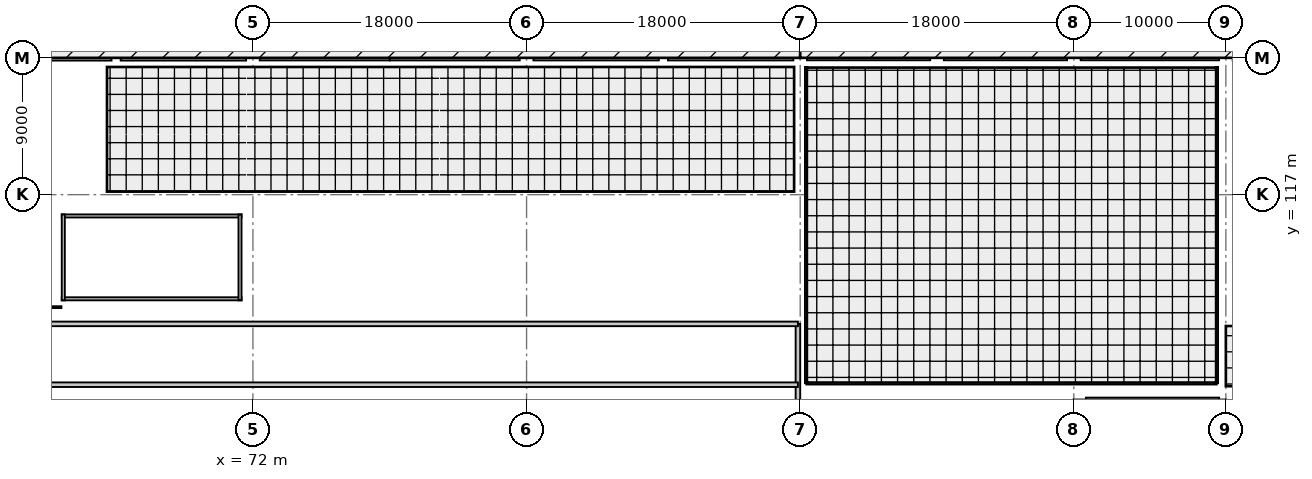
"""IFC4 building model, lengths in metres.
Left out: names, types, materials, properties, quantities, classifications, styles, units other than length and angle.
Written with IfcOpenShell. Run it as: python <this file> out.ifc"""

import sys

from ifc_helpers import new_model, si_unit, direction, frame, frame_2d, origin, origin_2d, place, context, subcontext, project, spatial, rectangle, i_section, extrude, element, fill, save


model = new_model("IFC4")
c1 = context("Model", 3, precision=1e-05, world=origin(), true_north=direction((0.0, 1.0)))
c2 = subcontext(c1, "Body", "Model", "MODEL_VIEW")
j1 = project(units=[si_unit("LENGTHUNIT", "METRE"), si_unit("PLANEANGLEUNIT", "RADIAN")], contexts=[c1])
p1 = place(None, origin())
s1 = spatial("IfcSite", under=j1, at=p1, CompositionType="ELEMENT")
p2 = place(p1, origin())
s2 = spatial("IfcBuilding", under=s1, at=p2, CompositionType="ELEMENT")
p3 = place(p2, origin())
s3 = spatial("IfcBuildingStorey", under=s2, at=p3, CompositionType="ELEMENT", Elevation=0.0)
p4 = place(p3, frame((72.0, 103.5, 0.0), z_axis=(0.0, 0.0, 1.0), x_axis=(1.0, 0.0, 0.0)))
e1 = element("IfcColumn", 1, at=p4, inside=s3, PredefinedType="COLUMN", context=c2, shape_type="SweptSolid", body=[
    extrude(rectangle(XDim=1.6, YDim=1.2, at=origin_2d()), origin(), (0.0, 0.0, 1.0), 6.6),
])
for number, where, z_axis, x_axis in (
    (2, (72.0, 117.0, 0.0), (0.0, 0.0, 1.0), (1.0, 0.0, 0.0)),
    (3, (72.0, 126.0, 0.0), (0.0, 0.0, 1.0), (1.0, 0.0, 0.0)),
):
    element("IfcColumn", number, at=place(p3, frame(where, z_axis=z_axis, x_axis=x_axis)), inside=s3, PredefinedType="COLUMN", context=c2, shape_type="SweptSolid", body=[
        extrude(rectangle(XDim=0.9, YDim=0.9, at=origin_2d()), origin(), (0.0, 0.0, 1.0), 6.6),
    ])
p5 = place(p3, frame((90.0, 103.5, 0.0), z_axis=(0.0, 0.0, 1.0), x_axis=(1.0, 0.0, 0.0)))
e4 = element("IfcColumn", 4, at=p5, inside=s3, PredefinedType="COLUMN", context=c2, shape_type="SweptSolid", body=[
    extrude(rectangle(XDim=1.6, YDim=1.2, at=origin_2d()), origin(), (0.0, 0.0, 1.0), 6.6),
])
for number, where, z_axis, x_axis in (
    (5, (90.0, 117.0, 0.0), (0.0, 0.0, 1.0), (1.0, 0.0, 0.0)),
    (6, (90.0, 126.0, 0.0), (0.0, 0.0, 1.0), (1.0, 0.0, 0.0)),
):
    element("IfcColumn", number, at=place(p3, frame(where, z_axis=z_axis, x_axis=x_axis)), inside=s3, PredefinedType="COLUMN", context=c2, shape_type="SweptSolid", body=[
        extrude(rectangle(XDim=0.9, YDim=0.9, at=origin_2d()), origin(), (0.0, 0.0, 1.0), 6.6),
    ])
p6 = place(p3, frame((108.0, 103.5, 0.0), z_axis=(0.0, 0.0, 1.0), x_axis=(1.0, 0.0, 0.0)))
e7 = element("IfcColumn", 7, at=p6, inside=s3, PredefinedType="COLUMN", context=c2, shape_type="SweptSolid", body=[
    extrude(rectangle(XDim=1.6, YDim=1.2, at=origin_2d()), origin(), (0.0, 0.0, 1.0), 6.6),
])
for number, where, z_axis, x_axis in (
    (8, (108.0, 117.0, 0.0), (0.0, 0.0, 1.0), (1.0, 0.0, 0.0)),
    (9, (108.0, 126.0, 0.0), (0.0, 0.0, 1.0), (1.0, 0.0, 0.0)),
):
    element("IfcColumn", number, at=place(p3, frame(where, z_axis=z_axis, x_axis=x_axis)), inside=s3, PredefinedType="COLUMN", context=c2, shape_type="SweptSolid", body=[
        extrude(rectangle(XDim=0.9, YDim=0.9, at=origin_2d()), origin(), (0.0, 0.0, 1.0), 6.6),
    ])
p7 = place(p3, frame((117.0, 103.5, 0.0), z_axis=(0.0, 0.0, 1.0), x_axis=(1.0, 0.0, 0.0)))
e10 = element("IfcColumn", 10, at=p7, inside=s3, PredefinedType="COLUMN", context=c2, shape_type="SweptSolid", body=[
    extrude(rectangle(XDim=1.6, YDim=1.2, at=origin_2d()), origin(), (0.0, 0.0, 1.0), 6.6),
])
for number, where, z_axis, x_axis in (
    (11, (117.0, 117.0, 0.0), (0.0, 0.0, 1.0), (1.0, 0.0, 0.0)),
    (12, (117.0, 126.0, 0.0), (0.0, 0.0, 1.0), (1.0, 0.0, 0.0)),
):
    element("IfcColumn", number, at=place(p3, frame(where, z_axis=z_axis, x_axis=x_axis)), inside=s3, PredefinedType="COLUMN", context=c2, shape_type="SweptSolid", body=[
        extrude(rectangle(XDim=0.9, YDim=0.9, at=origin_2d()), origin(), (0.0, 0.0, 1.0), 6.6),
    ])
p8 = place(p3, frame((126.0, 103.5, 0.0), z_axis=(0.0, 0.0, 1.0), x_axis=(1.0, 0.0, 0.0)))
e13 = element("IfcColumn", 13, at=p8, inside=s3, PredefinedType="COLUMN", context=c2, shape_type="SweptSolid", body=[
    extrude(rectangle(XDim=1.6, YDim=1.2, at=origin_2d()), origin(), (0.0, 0.0, 1.0), 6.6),
])
for number, where, z_axis, x_axis in (
    (14, (126.0, 117.0, 0.0), (0.0, 0.0, 1.0), (1.0, 0.0, 0.0)),
    (15, (126.0, 126.0, 0.0), (0.0, 0.0, 1.0), (1.0, 0.0, 0.0)),
    (16, (136.0, 103.5, 0.0), (0.0, 0.0, 1.0), (1.0, 0.0, 0.0)),
    (17, (136.0, 117.0, 0.0), (0.0, 0.0, 1.0), (1.0, 0.0, 0.0)),
    (18, (136.0, 126.0, 0.0), (0.0, 0.0, 1.0), (1.0, 0.0, 0.0)),
):
    element("IfcColumn", number, at=place(p3, frame(where, z_axis=z_axis, x_axis=x_axis)), inside=s3, PredefinedType="COLUMN", context=c2, shape_type="SweptSolid", body=[
        extrude(rectangle(XDim=0.9, YDim=0.9, at=origin_2d()), origin(), (0.0, 0.0, 1.0), 6.6),
    ])
p9 = place(p3, frame((63.0, 126.0, 0.0), z_axis=(0.0, 0.0, 1.0), x_axis=(1.0, 0.0, 0.0)))
e19 = element("IfcColumn", 19, at=p9, inside=s3, PredefinedType="PILASTER", context=c2, shape_type="SweptSolid", body=[
    extrude(rectangle(XDim=0.6, YDim=0.4, at=origin_2d()), origin(), (0.0, 0.0, 1.0), 6.28),
])
p10 = place(p3, frame((81.0, 126.0, 0.0), z_axis=(0.0, 0.0, 1.0), x_axis=(1.0, 0.0, 0.0)))
e20 = element("IfcColumn", 20, at=p10, inside=s3, PredefinedType="PILASTER", context=c2, shape_type="SweptSolid", body=[
    extrude(i_section(OverallWidth=0.2, OverallDepth=0.2, WebThickness=0.008, FlangeThickness=0.012, FilletRadius=0.013, at=origin_2d()), origin(), (0.0, 0.0, 1.0), 6.28),
])
p11 = place(p3, frame((99.0, 126.0, 0.0), z_axis=(0.0, 0.0, 1.0), x_axis=(1.0, 0.0, 0.0)))
e21 = element("IfcColumn", 21, at=p11, inside=s3, PredefinedType="PILASTER", context=c2, shape_type="SweptSolid", body=[
    extrude(rectangle(XDim=0.6, YDim=0.4, at=origin_2d()), origin(), (0.0, 0.0, 1.0), 6.28),
])
p12 = place(p3, frame((107.85, 103.5, -1.25), z_axis=(0.0, 0.0, 1.0), x_axis=(0.0, 1.0, 0.0)))
e22 = element("IfcWall", 22, at=p12, inside=s3, PredefinedType="SOLIDWALL", context=c2, shape_type="SweptSolid", body=[
    extrude(rectangle(XDim=5.0, YDim=0.3, at=frame_2d((2.5, 0.0))), origin(), (0.0, 0.0, 1.0), 2.5),
])
for number, where, z_axis, x_axis in (
    (23, (0.15, 104.5, -1.25), (0.0, 0.0, 1.0), (1.0, 0.0, 0.0)),
    (24, (0.15, 108.5, -1.25), (0.0, 0.0, 1.0), (1.0, 0.0, 0.0)),
):
    element("IfcWall", number, at=place(p3, frame(where, z_axis=z_axis, x_axis=x_axis)), inside=s3, PredefinedType="SOLIDWALL", context=c2, shape_type="SweptSolid", body=[
        extrude(rectangle(XDim=107.7, YDim=0.3, at=frame_2d((53.85, 0.0))), origin(), (0.0, 0.0, 1.0), 0.87),
    ])
p13 = place(p3, frame((54.45, 126.0, 0.0), z_axis=(0.0, 0.0, 1.0), x_axis=(1.0, 0.0, 0.0)))
e25 = element("IfcWall", 25, at=p13, inside=s3, PredefinedType="SOLIDWALL", context=c2, shape_type="SweptSolid", body=[
    extrude(rectangle(XDim=8.25, YDim=0.36, at=frame_2d((4.125, 0.0))), origin(), (0.0, 0.0, 1.0), 5.79),
])
p14 = place(p13, frame((3.0, 0.0, 0.0)))
e26 = element("IfcOpeningElement", 26, at=p14, cuts=e25, PredefinedType="OPENING", context=c2, shape_type="SweptSolid", body=[
    extrude(rectangle(XDim=2.2, YDim=2.45, at=frame_2d((1.1, 1.225))), frame((0.0, 0.19, 0.0), z_axis=(0.0, -1.0, 0.0), x_axis=(1.0, 0.0, 0.0)), (0.0, 0.0, 1.0), 0.38),
])
p15 = place(p3, frame((63.3, 126.0, 0.0), z_axis=(0.0, 0.0, 1.0), x_axis=(1.0, 0.0, 0.0)))
e27 = element("IfcWall", 27, at=p15, inside=s3, PredefinedType="SOLIDWALL", context=c2, shape_type="SweptSolid", body=[
    extrude(rectangle(XDim=8.25, YDim=0.36, at=frame_2d((4.125, 0.0))), origin(), (0.0, 0.0, 1.0), 5.79),
])
p16 = place(p15, frame((2.95, 0.0, 0.95)))
e28 = element("IfcOpeningElement", 28, at=p16, cuts=e27, PredefinedType="OPENING", context=c2, shape_type="SweptSolid", body=[
    extrude(rectangle(XDim=2.4, YDim=2.1, at=frame_2d((1.2, 1.05))), frame((0.0, 0.19, 0.0), z_axis=(0.0, -1.0, 0.0), x_axis=(1.0, 0.0, 0.0)), (0.0, 0.0, 1.0), 0.38),
])
p17 = place(p3, frame((72.45, 126.0, 0.0), z_axis=(0.0, 0.0, 1.0), x_axis=(1.0, 0.0, 0.0)))
e29 = element("IfcWall", 29, at=p17, inside=s3, PredefinedType="SOLIDWALL", context=c2, shape_type="SweptSolid", body=[
    extrude(rectangle(XDim=8.546, YDim=0.34, at=frame_2d((4.273, 0.0))), origin(), (0.0, 0.0, 1.0), 5.79),
])
p18 = place(p17, frame((3.1, 0.0, 0.0)))
e30 = element("IfcOpeningElement", 30, at=p18, cuts=e29, PredefinedType="OPENING", context=c2, shape_type="SweptSolid", body=[
    extrude(rectangle(XDim=2.0, YDim=2.4, at=frame_2d((1.0, 1.2))), frame((0.0, 0.18, 0.0), z_axis=(0.0, -1.0, 0.0), x_axis=(1.0, 0.0, 0.0)), (0.0, 0.0, 1.0), 0.36),
])
p19 = place(p3, frame((81.004, 126.0, 0.0), z_axis=(0.0, 0.0, 1.0), x_axis=(1.0, 0.0, 0.0)))
e31 = element("IfcWall", 31, at=p19, inside=s3, PredefinedType="SOLIDWALL", context=c2, shape_type="SweptSolid", body=[
    extrude(rectangle(XDim=8.546, YDim=0.34, at=frame_2d((4.273, 0.0))), origin(), (0.0, 0.0, 1.0), 5.79),
])
p20 = place(p19, frame((3.396, 0.0, 0.95)))
e32 = element("IfcOpeningElement", 32, at=p20, cuts=e31, PredefinedType="OPENING", context=c2, shape_type="SweptSolid", body=[
    extrude(rectangle(XDim=2.1, YDim=2.0, at=frame_2d((1.05, 1.0))), frame((0.0, 0.18, 0.0), z_axis=(0.0, -1.0, 0.0), x_axis=(1.0, 0.0, 0.0)), (0.0, 0.0, 1.0), 0.36),
])
p21 = place(p3, frame((90.45, 126.0, 0.0), z_axis=(0.0, 0.0, 1.0), x_axis=(1.0, 0.0, 0.0)))
e33 = element("IfcWall", 33, at=p21, inside=s3, PredefinedType="SOLIDWALL", context=c2, shape_type="SweptSolid", body=[
    extrude(rectangle(XDim=8.25, YDim=0.34, at=frame_2d((4.125, 0.0))), origin(), (0.0, 0.0, 1.0), 5.79),
])
p22 = place(p21, frame((3.2, 0.0, 0.95)))
e34 = element("IfcOpeningElement", 34, at=p22, cuts=e33, PredefinedType="OPENING", context=c2, shape_type="SweptSolid", body=[
    extrude(rectangle(XDim=1.8, YDim=2.0, at=frame_2d((0.9, 1.0))), frame((0.0, 0.18, 0.0), z_axis=(0.0, -1.0, 0.0), x_axis=(1.0, 0.0, 0.0)), (0.0, 0.0, 1.0), 0.36),
])
p23 = place(p3, frame((99.3, 126.0, 0.0), z_axis=(0.0, 0.0, 1.0), x_axis=(1.0, 0.0, 0.0)))
e35 = element("IfcWall", 35, at=p23, inside=s3, PredefinedType="SOLIDWALL", context=c2, shape_type="SweptSolid", body=[
    extrude(rectangle(XDim=8.25, YDim=0.34, at=frame_2d((4.125, 0.0))), origin(), (0.0, 0.0, 1.0), 5.79),
])
p24 = place(p23, frame((3.25, 0.0, 0.0)))
e36 = element("IfcOpeningElement", 36, at=p24, cuts=e35, PredefinedType="OPENING", context=c2, shape_type="SweptSolid", body=[
    extrude(rectangle(XDim=1.8, YDim=2.35, at=frame_2d((0.9, 1.175))), frame((0.0, 0.18, 0.0), z_axis=(0.0, -1.0, 0.0), x_axis=(1.0, 0.0, 0.0)), (0.0, 0.0, 1.0), 0.36),
])
p25 = place(p3, frame((108.45, 126.0, 0.0), z_axis=(0.0, 0.0, 1.0), x_axis=(1.0, 0.0, 0.0)))
e37 = element("IfcWall", 37, at=p25, inside=s3, PredefinedType="SOLIDWALL", context=c2, shape_type="SweptSolid", body=[
    extrude(rectangle(XDim=8.1, YDim=0.32, at=frame_2d((4.05, 0.0))), origin(), (0.0, 0.0, 1.0), 5.79),
])
p26 = place(p25, frame((3.3, 0.0, 0.95)))
e38 = element("IfcOpeningElement", 38, at=p26, cuts=e37, PredefinedType="OPENING", context=c2, shape_type="SweptSolid", body=[
    extrude(rectangle(XDim=1.6, YDim=1.9, at=frame_2d((0.8, 0.95))), frame((0.0, 0.17, 0.0), z_axis=(0.0, -1.0, 0.0), x_axis=(1.0, 0.0, 0.0)), (0.0, 0.0, 1.0), 0.34),
])
p27 = place(p3, frame((117.45, 126.0, 0.0), z_axis=(0.0, 0.0, 1.0), x_axis=(1.0, 0.0, 0.0)))
e39 = element("IfcWall", 39, at=p27, inside=s3, PredefinedType="SOLIDWALL", context=c2, shape_type="SweptSolid", body=[
    extrude(rectangle(XDim=8.1, YDim=0.32, at=frame_2d((4.05, 0.0))), origin(), (0.0, 0.0, 1.0), 5.855),
])
p28 = place(p27, frame((2.8, 0.0, 0.0)))
e40 = element("IfcOpeningElement", 40, at=p28, cuts=e39, PredefinedType="OPENING", context=c2, shape_type="SweptSolid", body=[
    extrude(rectangle(XDim=2.4, YDim=2.5, at=frame_2d((1.2, 1.25))), frame((0.0, 0.17, 0.0), z_axis=(0.0, -1.0, 0.0), x_axis=(1.0, 0.0, 0.0)), (0.0, 0.0, 1.0), 0.34),
])
p29 = place(p3, frame((126.45, 126.0, 0.0), z_axis=(0.0, 0.0, 1.0), x_axis=(1.0, 0.0, 0.0)))
e41 = element("IfcWall", 41, at=p29, inside=s3, PredefinedType="SOLIDWALL", context=c2, shape_type="SweptSolid", body=[
    extrude(rectangle(XDim=9.1, YDim=0.32, at=frame_2d((4.55, 0.0))), origin(), (0.0, 0.0, 1.0), 5.855),
])
p30 = place(p29, frame((3.35, 0.0, 0.0)))
e42 = element("IfcOpeningElement", 42, at=p30, cuts=e41, PredefinedType="OPENING", context=c2, shape_type="SweptSolid", body=[
    extrude(rectangle(XDim=2.4, YDim=2.5, at=frame_2d((1.2, 1.25))), frame((0.0, 0.17, 0.0), z_axis=(0.0, -1.0, 0.0), x_axis=(1.0, 0.0, 0.0)), (0.0, 0.0, 1.0), 0.34),
])
p31 = place(p3, frame((135.55, 103.5, 0.0), z_axis=(0.0, 0.0, 1.0), x_axis=(-1.0, 0.0, 0.0)))
e43 = element("IfcWall", 43, at=p31, inside=s3, PredefinedType="SOLIDWALL", context=c2, shape_type="SweptSolid", body=[
    extrude(rectangle(XDim=8.75, YDim=0.3, at=frame_2d((4.375, 0.0))), origin(), (0.0, 0.0, 1.0), 5.495),
])
p32 = place(p31, frame((3.2, 0.0, 0.95)))
e44 = element("IfcOpeningElement", 44, at=p32, cuts=e43, PredefinedType="OPENING", context=c2, shape_type="SweptSolid", body=[
    extrude(rectangle(XDim=2.7, YDim=2.1, at=frame_2d((1.35, 1.05))), frame((0.0, 0.16, 0.0), z_axis=(0.0, -1.0, 0.0), x_axis=(1.0, 0.0, 0.0)), (0.0, 0.0, 1.0), 0.32),
])
for number, where, z_axis, x_axis in (
    (45, (59.425, 110.15, 0.0), (0.0, 0.0, 1.0), (1.0, 0.0, 0.0)),
    (46, (71.25, 115.6, 0.0), (0.0, 0.0, 1.0), (-1.0, 0.0, 0.0)),
):
    element("IfcWall", number, at=place(p3, frame(where, z_axis=z_axis, x_axis=x_axis)), inside=s3, PredefinedType="SOLIDWALL", context=c2, shape_type="SweptSolid", body=[
        extrude(rectangle(XDim=11.825, YDim=0.2, at=frame_2d((5.913, 0.0))), origin(), (0.0, 0.0, 1.0), 6.32),
    ])
p33 = place(p3, frame((71.15, 110.05, 0.0), z_axis=(0.0, 0.0, 1.0), x_axis=(0.0, 1.0, 0.0)))
e47 = element("IfcWall", 47, at=p33, inside=s3, PredefinedType="SOLIDWALL", context=c2, shape_type="SweptSolid", body=[
    extrude(rectangle(XDim=5.65, YDim=0.2, at=frame_2d((2.825, 0.0))), origin(), (0.0, 0.0, 1.0), 6.32),
])
p34 = place(p3, frame((59.525, 115.7, 0.0), z_axis=(0.0, 0.0, 1.0), x_axis=(0.0, -1.0, 0.0)))
e48 = element("IfcWall", 48, at=p34, inside=s3, PredefinedType="SOLIDWALL", context=c2, shape_type="SweptSolid", body=[
    extrude(rectangle(XDim=5.65, YDim=0.2, at=frame_2d((2.825, 0.0))), origin(), (0.0, 0.0, 1.0), 4.4),
])
p35 = place(p34, frame((2.025, 0.0, 0.0)))
e49 = element("IfcOpeningElement", 49, at=p35, cuts=e48, PredefinedType="OPENING", context=c2, shape_type="SweptSolid", body=[
    extrude(rectangle(XDim=1.6, YDim=2.15, at=frame_2d((0.8, 1.075))), frame((0.0, 0.11, 0.0), z_axis=(0.0, -1.0, 0.0), x_axis=(1.0, 0.0, 0.0)), (0.0, 0.0, 1.0), 0.22),
])
p36 = place(p3, frame((59.4, 109.6, 0.0), z_axis=(0.0, 0.0, 1.0), x_axis=(-1.0, 0.0, 0.0)))
e50 = element("IfcWall", 50, at=p36, inside=s3, PredefinedType="PARTITIONING", context=c2, shape_type="SweptSolid", body=[
    extrude(rectangle(XDim=2.6, YDim=0.12, at=frame_2d((1.3, 0.0))), origin(), (0.0, 0.0, 1.0), 4.4),
])
p37 = place(p3, frame((135.4, 104.6, 0.0), z_axis=(0.0, 0.0, 1.0), x_axis=(-1.0, 0.0, 0.0)))
e51 = element("IfcWall", 51, at=p37, inside=s3, PredefinedType="PARTITIONING", context=c2, shape_type="SweptSolid", body=[
    extrude(rectangle(XDim=27.0, YDim=0.175, at=frame_2d((13.5, 0.0))), origin(), (0.0, 0.0, 1.0), 4.4),
])
p38 = place(p3, frame((108.4, 104.6, 0.0), z_axis=(0.0, 0.0, 1.0), x_axis=(0.0, 1.0, 0.0)))
e52 = element("IfcWall", 52, at=p38, inside=s3, PredefinedType="PARTITIONING", context=c2, shape_type="SweptSolid", body=[
    extrude(rectangle(XDim=20.8, YDim=0.175, at=frame_2d((10.4, 0.0))), origin(), (0.0, 0.0, 1.0), 4.4),
])
p39 = place(p3, frame((135.4, 125.4, 0.0), z_axis=(0.0, 0.0, 1.0), x_axis=(0.0, -1.0, 0.0)))
e53 = element("IfcWall", 53, at=p39, inside=s3, PredefinedType="PARTITIONING", context=c2, shape_type="SweptSolid", body=[
    extrude(rectangle(XDim=20.8, YDim=0.175, at=frame_2d((10.4, 0.0))), origin(), (0.0, 0.0, 1.0), 4.4),
])
p40 = place(p39, frame((9.725, 0.0, 0.0)))
e54 = element("IfcOpeningElement", 54, at=p40, cuts=e53, PredefinedType="OPENING", context=c2, shape_type="SweptSolid", body=[
    extrude(rectangle(XDim=1.35, YDim=2.1, at=frame_2d((0.675, 1.05))), frame((0.0, 0.097, 0.0), z_axis=(0.0, -1.0, 0.0), x_axis=(1.0, 0.0, 0.0)), (0.0, 0.0, 1.0), 0.195),
])
p41 = place(p14, origin())
e55 = element("IfcDoor", 55, at=p41, inside=s3, OperationType="SINGLE_SWING_RIGHT", PredefinedType="DOOR", context=c2, shape_type="SweptSolid", body=[
    extrude(rectangle(XDim=2.2, YDim=2.45, at=frame_2d((1.1, 1.225))), frame((0.0, 0.025, 0.0), z_axis=(0.0, -1.0, 0.0), x_axis=(1.0, 0.0, 0.0)), (0.0, 0.0, 1.0), 0.05),
])
fill(e26, e55)
p42 = place(p16, origin())
e56 = element("IfcWindow", 56, at=p42, inside=s3, PartitioningType="SINGLE_PANEL", PredefinedType="WINDOW", context=c2, shape_type="SweptSolid", body=[
    extrude(rectangle(XDim=2.4, YDim=2.1, at=frame_2d((1.2, 1.05))), frame((0.0, 0.03, 0.0), z_axis=(0.0, -1.0, 0.0), x_axis=(1.0, 0.0, 0.0)), (0.0, 0.0, 1.0), 0.06),
])
fill(e28, e56)
p43 = place(p18, origin())
e57 = element("IfcDoor", 57, at=p43, inside=s3, OperationType="SINGLE_SWING_LEFT", PredefinedType="DOOR", context=c2, shape_type="SweptSolid", body=[
    extrude(rectangle(XDim=2.0, YDim=2.4, at=frame_2d((1.0, 1.2))), frame((0.0, 0.025, 0.0), z_axis=(0.0, -1.0, 0.0), x_axis=(1.0, 0.0, 0.0)), (0.0, 0.0, 1.0), 0.05),
])
fill(e30, e57)
p44 = place(p20, origin())
e58 = element("IfcWindow", 58, at=p44, inside=s3, PartitioningType="SINGLE_PANEL", PredefinedType="WINDOW", context=c2, shape_type="SweptSolid", body=[
    extrude(rectangle(XDim=2.1, YDim=2.0, at=frame_2d((1.05, 1.0))), frame((0.0, 0.03, 0.0), z_axis=(0.0, -1.0, 0.0), x_axis=(1.0, 0.0, 0.0)), (0.0, 0.0, 1.0), 0.06),
])
fill(e32, e58)
p45 = place(p22, origin())
e59 = element("IfcWindow", 59, at=p45, inside=s3, PartitioningType="SINGLE_PANEL", PredefinedType="WINDOW", context=c2, shape_type="SweptSolid", body=[
    extrude(rectangle(XDim=1.8, YDim=2.0, at=frame_2d((0.9, 1.0))), frame((0.0, 0.03, 0.0), z_axis=(0.0, -1.0, 0.0), x_axis=(1.0, 0.0, 0.0)), (0.0, 0.0, 1.0), 0.06),
])
fill(e34, e59)
p46 = place(p24, origin())
e60 = element("IfcDoor", 60, at=p46, inside=s3, OperationType="SINGLE_SWING_RIGHT", PredefinedType="DOOR", context=c2, shape_type="SweptSolid", body=[
    extrude(rectangle(XDim=1.8, YDim=2.35, at=frame_2d((0.9, 1.175))), frame((0.0, 0.025, 0.0), z_axis=(0.0, -1.0, 0.0), x_axis=(1.0, 0.0, 0.0)), (0.0, 0.0, 1.0), 0.05),
])
fill(e36, e60)
p47 = place(p26, origin())
e61 = element("IfcWindow", 61, at=p47, inside=s3, PartitioningType="SINGLE_PANEL", PredefinedType="WINDOW", context=c2, shape_type="SweptSolid", body=[
    extrude(rectangle(XDim=1.6, YDim=1.9, at=frame_2d((0.8, 0.95))), frame((0.0, 0.03, 0.0), z_axis=(0.0, -1.0, 0.0), x_axis=(1.0, 0.0, 0.0)), (0.0, 0.0, 1.0), 0.06),
])
fill(e38, e61)
p48 = place(p28, origin())
e62 = element("IfcDoor", 62, at=p48, inside=s3, OperationType="SINGLE_SWING_LEFT", PredefinedType="DOOR", context=c2, shape_type="SweptSolid", body=[
    extrude(rectangle(XDim=2.4, YDim=2.5, at=frame_2d((1.2, 1.25))), frame((0.0, 0.025, 0.0), z_axis=(0.0, -1.0, 0.0), x_axis=(1.0, 0.0, 0.0)), (0.0, 0.0, 1.0), 0.05),
])
fill(e40, e62)
p49 = place(p30, origin())
e63 = element("IfcDoor", 63, at=p49, inside=s3, OperationType="SINGLE_SWING_RIGHT", PredefinedType="DOOR", context=c2, shape_type="SweptSolid", body=[
    extrude(rectangle(XDim=2.4, YDim=2.5, at=frame_2d((1.2, 1.25))), frame((0.0, 0.025, 0.0), z_axis=(0.0, -1.0, 0.0), x_axis=(1.0, 0.0, 0.0)), (0.0, 0.0, 1.0), 0.05),
])
fill(e42, e63)
p50 = place(p35, origin())
e64 = element("IfcDoor", 64, at=p50, inside=s3, OperationType="SINGLE_SWING_RIGHT", PredefinedType="DOOR", context=c2, shape_type="SweptSolid", body=[
    extrude(rectangle(XDim=1.6, YDim=2.15, at=frame_2d((0.8, 1.075))), frame((0.0, 0.025, 0.0), z_axis=(0.0, -1.0, 0.0), x_axis=(1.0, 0.0, 0.0)), (0.0, 0.0, 1.0), 0.05),
])
fill(e49, e64)
p51 = place(p40, origin())
e65 = element("IfcDoor", 65, at=p51, inside=s3, OperationType="SINGLE_SWING_RIGHT", PredefinedType="DOOR", context=c2, shape_type="SweptSolid", body=[
    extrude(rectangle(XDim=1.35, YDim=2.1, at=frame_2d((0.675, 1.05))), frame((0.0, 0.025, 0.0), z_axis=(0.0, -1.0, 0.0), x_axis=(1.0, 0.0, 0.0)), (0.0, 0.0, 1.0), 0.05),
])
fill(e54, e65)
save(model, sys.argv[1])
